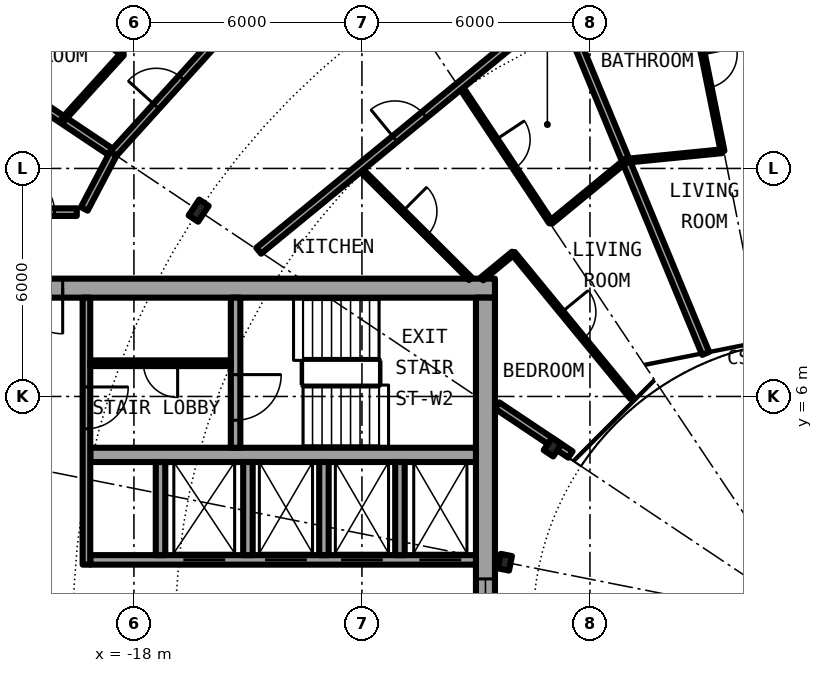
"""IFC4 building model, lengths in metres.
Left out: names, types, materials, properties, quantities, classifications, styles, units other than length and angle.
Written with IfcOpenShell. Run it as: python <this file> out.ifc"""

import sys

from ifc_helpers import new_model, si_unit, direction, frame, frame_2d, origin, origin_2d, place, context, subcontext, project, spatial, rectangle, i_section, extrude, element, fill, save


model = new_model("IFC4")
c1 = context("Model", 3, precision=1e-05, world=origin(), true_north=direction((0.0, 1.0)))
c2 = subcontext(c1, "Body", "Model", "MODEL_VIEW")
j1 = project(units=[si_unit("LENGTHUNIT", "METRE"), si_unit("PLANEANGLEUNIT", "RADIAN")], contexts=[c1])
p1 = place(None, origin())
s1 = spatial("IfcSite", under=j1, at=p1, CompositionType="ELEMENT")
p2 = place(p1, origin())
s2 = spatial("IfcBuilding", under=s1, at=p2, CompositionType="ELEMENT")
p3 = place(p2, frame((0.0, 0.0, 145.2)))
s3 = spatial("IfcBuildingStorey", under=s2, at=p3, CompositionType="ELEMENT", Elevation=145.2)
p4 = place(p3, frame((-16.297, 10.889, 0.0), z_axis=(0.0, 0.0, 1.0), x_axis=(-0.831469612303, 0.55557023302, 0.0)))
e1 = element("IfcColumn", 1, at=p4, inside=s3, PredefinedType="COLUMN", context=c2, shape_type="SweptSolid", body=[
    extrude(i_section(OverallWidth=0.3, OverallDepth=0.5, WebThickness=0.014, FlangeThickness=0.028, FilletRadius=0.027, at=origin_2d()), origin(), (0.0, 0.0, 1.0), 3.05),
])
for number, where, z_axis, x_axis in (
    (2, (-6.984, 4.667, 0.0), (0.0, 0.0, 1.0), (-0.831, 0.556, 0.0)),
    (3, (-8.239, 1.639, 0.0), (0.0, 0.0, 1.0), (-0.981, 0.195, 0.0)),
):
    element("IfcColumn", number, at=place(p3, frame(where, z_axis=z_axis, x_axis=x_axis)), inside=s3, PredefinedType="COLUMN", context=c2, shape_type="SweptSolid", body=[
        extrude(i_section(OverallWidth=0.3, OverallDepth=0.39, WebThickness=0.011, FlangeThickness=0.019, FilletRadius=0.027, at=origin_2d()), origin(), (0.0, 0.0, 1.0), 3.05),
    ])
p5 = place(p3, frame((-8.5, 8.85, 0.0), z_axis=(0.0, 0.0, 1.0), x_axis=(-1.0, 0.0, 0.0)))
e4 = element("IfcWall", 4, at=p5, inside=s3, PredefinedType="SHEAR", context=c2, shape_type="SweptSolid", body=[
    extrude(rectangle(XDim=13.6, YDim=0.5, at=frame_2d((6.8, 0.0))), origin(), (0.0, 0.0, 1.0), 3.05),
])
p6 = place(p5, frame((11.375, 0.0, 0.0)))
e5 = element("IfcOpeningElement", 5, at=p6, cuts=e4, PredefinedType="OPENING", context=c2, shape_type="SweptSolid", body=[
    extrude(rectangle(XDim=1.2, YDim=2.3, at=frame_2d((0.6, 1.15))), frame((0.0, 0.26, 0.0), z_axis=(0.0, -1.0, 0.0), x_axis=(1.0, 0.0, 0.0)), (0.0, 0.0, 1.0), 0.52),
])
p7 = place(p3, frame((-8.75, 8.6, 0.0), z_axis=(0.0, 0.0, 1.0), x_axis=(0.0, -1.0, 0.0)))
e6 = element("IfcWall", 6, at=p7, inside=s3, PredefinedType="SHEAR", context=c2, shape_type="SweptSolid", body=[
    extrude(rectangle(XDim=17.2, YDim=0.5, at=frame_2d((8.6, 0.0))), origin(), (0.0, 0.0, 1.0), 3.05),
])
p8 = place(p7, frame((7.4, 0.0, 0.1)))
e7 = element("IfcOpeningElement", 7, at=p8, cuts=e6, PredefinedType="OPENING", context=c2, shape_type="SweptSolid", body=[
    extrude(rectangle(XDim=2.4, YDim=2.2, at=frame_2d((1.2, 1.1))), frame((0.0, 0.26, 0.0), z_axis=(0.0, -1.0, 0.0), x_axis=(1.0, 0.0, 0.0)), (0.0, 0.0, 1.0), 0.52),
])
p9 = place(p3, frame((-9.0, 1.7, 0.0), z_axis=(0.0, 0.0, 1.0), x_axis=(-1.0, 0.0, 0.0)))
e8 = element("IfcWall", 8, at=p9, inside=s3, PredefinedType="SHEAR", context=c2, shape_type="SweptSolid", body=[
    extrude(rectangle(XDim=10.15, YDim=0.25, at=frame_2d((5.075, 0.0))), origin(), (0.0, 0.0, 1.0), 3.05),
])
p10 = place(p9, frame((0.387, 0.0, 0.0)))
e9 = element("IfcOpeningElement", 9, at=p10, cuts=e8, PredefinedType="OPENING", context=c2, shape_type="SweptSolid", body=[
    extrude(rectangle(XDim=1.1, YDim=2.3, at=frame_2d((0.55, 1.15))), frame((0.0, 0.135, 0.0), z_axis=(0.0, -1.0, 0.0), x_axis=(1.0, 0.0, 0.0)), (0.0, 0.0, 1.0), 0.27),
])
p11 = place(p9, frame((2.45, 0.0, 0.0)))
e10 = element("IfcOpeningElement", 10, at=p11, cuts=e8, PredefinedType="OPENING", context=c2, shape_type="SweptSolid", body=[
    extrude(rectangle(XDim=1.1, YDim=2.3, at=frame_2d((0.55, 1.15))), frame((0.0, 0.135, 0.0), z_axis=(0.0, -1.0, 0.0), x_axis=(1.0, 0.0, 0.0)), (0.0, 0.0, 1.0), 0.27),
])
p12 = place(p9, frame((4.45, 0.0, 0.0)))
e11 = element("IfcOpeningElement", 11, at=p12, cuts=e8, PredefinedType="OPENING", context=c2, shape_type="SweptSolid", body=[
    extrude(rectangle(XDim=1.1, YDim=2.3, at=frame_2d((0.55, 1.15))), frame((0.0, 0.135, 0.0), z_axis=(0.0, -1.0, 0.0), x_axis=(1.0, 0.0, 0.0)), (0.0, 0.0, 1.0), 0.27),
])
p13 = place(p9, frame((6.6, 0.0, 0.0)))
e12 = element("IfcOpeningElement", 12, at=p13, cuts=e8, PredefinedType="OPENING", context=c2, shape_type="SweptSolid", body=[
    extrude(rectangle(XDim=1.1, YDim=2.3, at=frame_2d((0.55, 1.15))), frame((0.0, 0.135, 0.0), z_axis=(0.0, -1.0, 0.0), x_axis=(1.0, 0.0, 0.0)), (0.0, 0.0, 1.0), 0.27),
])
p14 = place(p3, frame((-9.0, 4.462, 0.0), z_axis=(0.0, 0.0, 1.0), x_axis=(-1.0, 0.0, 0.0)))
e13 = element("IfcWall", 13, at=p14, inside=s3, PredefinedType="SHEAR", context=c2, shape_type="SweptSolid", body=[
    extrude(rectangle(XDim=10.15, YDim=0.375, at=frame_2d((5.075, 0.0))), origin(), (0.0, 0.0, 1.0), 3.05),
])
p15 = place(p3, frame((-15.325, 8.6, 0.0), z_axis=(0.0, 0.0, 1.0), x_axis=(0.0, -1.0, 0.0)))
e14 = element("IfcWall", 14, at=p15, inside=s3, PredefinedType="SHEAR", context=c2, shape_type="SweptSolid", body=[
    extrude(rectangle(XDim=3.95, YDim=0.25, at=frame_2d((1.975, 0.0))), origin(), (0.0, 0.0, 1.0), 3.05),
])
p16 = place(p15, frame((2.025, 0.0, 0.0)))
e15 = element("IfcOpeningElement", 15, at=p16, cuts=e14, PredefinedType="OPENING", context=c2, shape_type="SweptSolid", body=[
    extrude(rectangle(XDim=1.2, YDim=2.3, at=frame_2d((0.6, 1.15))), frame((0.0, 0.135, 0.0), z_axis=(0.0, -1.0, 0.0), x_axis=(1.0, 0.0, 0.0)), (0.0, 0.0, 1.0), 0.27),
])
for number, where, z_axis, x_axis in (
    (16, (-15.0, 1.825, 0.0), (0.0, 0.0, 1.0), (0.0, 1.0, 0.0)),
    (17, (-17.3, 1.825, 0.0), (0.0, 0.0, 1.0), (0.0, 1.0, 0.0)),
):
    element("IfcWall", number, at=place(p3, frame(where, z_axis=z_axis, x_axis=x_axis)), inside=s3, PredefinedType="SOLIDWALL", context=c2, shape_type="SweptSolid", body=[
        extrude(rectangle(XDim=2.45, YDim=0.25, at=frame_2d((1.225, 0.0))), origin(), (0.0, 0.0, 1.0), 2.7),
    ])
p17 = place(p3, frame((-19.25, 8.6, 0.0), z_axis=(0.0, 0.0, 1.0), x_axis=(0.0, -1.0, 0.0)))
e18 = element("IfcWall", 18, at=p17, inside=s3, PredefinedType="SOLIDWALL", context=c2, shape_type="SweptSolid", body=[
    extrude(rectangle(XDim=7.025, YDim=0.2, at=frame_2d((3.513, 0.0))), origin(), (0.0, 0.0, 1.0), 2.7),
])
p18 = place(p17, frame((2.35, 0.0, 0.0)))
e19 = element("IfcOpeningElement", 19, at=p18, cuts=e18, PredefinedType="OPENING", context=c2, shape_type="SweptSolid", body=[
    extrude(rectangle(XDim=1.1, YDim=2.3, at=frame_2d((0.55, 1.15))), frame((0.0, 0.11, 0.0), z_axis=(0.0, -1.0, 0.0), x_axis=(1.0, 0.0, 0.0)), (0.0, 0.0, 1.0), 0.22),
])
for number, where, z_axis, x_axis in (
    (20, (-11.0, 1.825, 0.0), (0.0, 0.0, 1.0), (0.0, 1.0, 0.0)),
    (21, (-13.0, 1.825, 0.0), (0.0, 0.0, 1.0), (0.0, 1.0, 0.0)),
):
    element("IfcWall", number, at=place(p3, frame(where, z_axis=z_axis, x_axis=x_axis)), inside=s3, PredefinedType="SOLIDWALL", context=c2, shape_type="SweptSolid", body=[
        extrude(rectangle(XDim=2.45, YDim=0.25, at=frame_2d((1.225, 0.0))), origin(), (0.0, 0.0, 1.0), 2.7),
    ])
p19 = place(p3, frame((-15.45, 6.875, 0.0), z_axis=(0.0, 0.0, 1.0), x_axis=(-1.0, 0.0, 0.0)))
e22 = element("IfcWall", 22, at=p19, inside=s3, PredefinedType="PARTITIONING", context=c2, shape_type="SweptSolid", body=[
    extrude(rectangle(XDim=3.7, YDim=0.15, at=frame_2d((1.85, 0.0))), origin(), (0.0, 0.0, 1.0), 2.7),
])
p20 = place(p19, frame((1.4, 0.0, 0.0)))
e23 = element("IfcOpeningElement", 23, at=p20, cuts=e22, PredefinedType="OPENING", context=c2, shape_type="SweptSolid", body=[
    extrude(rectangle(XDim=0.9, YDim=2.3, at=frame_2d((0.45, 1.15))), frame((0.0, 0.085, 0.0), z_axis=(0.0, -1.0, 0.0), x_axis=(1.0, 0.0, 0.0)), (0.0, 0.0, 1.0), 0.17),
])
p21 = place(p3, frame((-22.595, 15.098, 0.0), z_axis=(0.0, 0.0, 1.0), x_axis=(0.831387096605, -0.55569370664, 0.0)))
e24 = element("IfcWall", 24, at=p21, inside=s3, PredefinedType="PARTITIONING", context=c2, shape_type="SweptSolid", body=[
    extrude(rectangle(XDim=4.875, YDim=0.2, at=frame_2d((2.438, 0.0))), origin(), (0.0, 0.0, 1.0), 2.7),
])
p22 = place(p3, frame((-21.012, 17.233, 0.0), z_axis=(0.0, 0.0, 1.0), x_axis=(0.773165322764, -0.634204528267, 0.0)))
e25 = element("IfcWall", 25, at=p22, inside=s3, PredefinedType="PARTITIONING", context=c2, shape_type="SweptSolid", body=[
    extrude(rectangle(XDim=3.505, YDim=0.1, at=frame_2d((1.752, 0.0))), origin(), (0.0, 0.0, 1.0), 2.7),
])
p23 = place(p22, frame((1.303, 0.0, 0.0)))
e26 = element("IfcOpeningElement", 26, at=p23, cuts=e25, PredefinedType="OPENING", context=c2, shape_type="SweptSolid", body=[
    extrude(rectangle(XDim=0.9, YDim=2.3, at=frame_2d((0.45, 1.15))), frame((0.0, 0.06, 0.0), z_axis=(0.0, -1.0, 0.0), x_axis=(1.0, 0.0, 0.0)), (0.0, 0.0, 1.0), 0.12),
])
p24 = place(p3, frame((-12.069, 12.007, 0.0), z_axis=(0.0, 0.0, 1.0), x_axis=(0.708822693149, -0.705386695138, 0.0)))
e27 = element("IfcWall", 27, at=p24, inside=s3, PredefinedType="PARTITIONING", context=c2, shape_type="SweptSolid", body=[
    extrude(rectangle(XDim=4.121, YDim=0.1, at=frame_2d((2.061, 0.0))), origin(), (0.0, 0.0, 1.0), 2.7),
])
p25 = place(p24, frame((1.611, 0.0, 0.0)))
e28 = element("IfcOpeningElement", 28, at=p25, cuts=e27, PredefinedType="OPENING", context=c2, shape_type="SweptSolid", body=[
    extrude(rectangle(XDim=0.9, YDim=2.3, at=frame_2d((0.45, 1.15))), frame((0.0, 0.06, 0.0), z_axis=(0.0, -1.0, 0.0), x_axis=(1.0, 0.0, 0.0)), (0.0, 0.0, 1.0), 0.12),
])
p26 = place(p3, frame((-9.421, 14.18, 0.0), z_axis=(0.0, 0.0, 1.0), x_axis=(0.553303732327, -0.832979579457, 0.0)))
e29 = element("IfcWall", 29, at=p26, inside=s3, PredefinedType="PARTITIONING", context=c2, shape_type="SweptSolid", body=[
    extrude(rectangle(XDim=4.319, YDim=0.1, at=frame_2d((2.16, 0.0))), origin(), (0.0, 0.0, 1.0), 2.7),
])
p27 = place(p26, frame((1.71, 0.0, 0.0)))
e30 = element("IfcOpeningElement", 30, at=p27, cuts=e29, PredefinedType="OPENING", context=c2, shape_type="SweptSolid", body=[
    extrude(rectangle(XDim=0.9, YDim=2.3, at=frame_2d((0.45, 1.15))), frame((0.0, 0.06, 0.0), z_axis=(0.0, -1.0, 0.0), x_axis=(1.0, 0.0, 0.0)), (0.0, 0.0, 1.0), 0.12),
])
p28 = place(p3, frame((-8.019, 9.771, 0.0), z_axis=(0.0, 0.0, 1.0), x_axis=(0.634401778971, -0.773003481776, 0.0)))
e31 = element("IfcWall", 31, at=p28, inside=s3, PredefinedType="PARTITIONING", context=c2, shape_type="SweptSolid", body=[
    extrude(rectangle(XDim=4.92, YDim=0.1, at=frame_2d((2.46, 0.0))), origin(), (0.0, 0.0, 1.0), 2.7),
])
p29 = place(p28, frame((2.01, 0.0, 0.0)))
e32 = element("IfcOpeningElement", 32, at=p29, cuts=e31, PredefinedType="OPENING", context=c2, shape_type="SweptSolid", body=[
    extrude(rectangle(XDim=0.9, YDim=2.3, at=frame_2d((0.45, 1.15))), frame((0.0, 0.06, 0.0), z_axis=(0.0, -1.0, 0.0), x_axis=(1.0, 0.0, 0.0)), (0.0, 0.0, 1.0), 0.12),
])
p30 = place(p3, frame((-6.775, 16.352, 0.0), z_axis=(0.0, 0.0, 1.0), x_axis=(0.382750767534, -0.923851638496, 0.0)))
e33 = element("IfcWall", 33, at=p30, inside=s3, PredefinedType="PARTITIONING", context=c2, shape_type="SweptSolid", body=[
    extrude(rectangle(XDim=9.98, YDim=0.2, at=frame_2d((4.99, 0.0))), origin(), (0.0, 0.0, 1.0), 2.7),
])
p31 = place(p3, frame((-3.365, 16.688, 0.0), z_axis=(0.0, 0.0, 1.0), x_axis=(0.197724661373, -0.980257597923, 0.0)))
e34 = element("IfcWall", 34, at=p31, inside=s3, PredefinedType="PARTITIONING", context=c2, shape_type="SweptSolid", body=[
    extrude(rectangle(XDim=4.319, YDim=0.1, at=frame_2d((2.16, 0.0))), origin(), (0.0, 0.0, 1.0), 2.7),
])
p32 = place(p31, frame((1.71, 0.0, 0.0)))
e35 = element("IfcOpeningElement", 35, at=p32, cuts=e34, PredefinedType="OPENING", context=c2, shape_type="SweptSolid", body=[
    extrude(rectangle(XDim=0.9, YDim=2.3, at=frame_2d((0.45, 1.15))), frame((0.0, 0.06, 0.0), z_axis=(0.0, -1.0, 0.0), x_axis=(1.0, 0.0, 0.0)), (0.0, 0.0, 1.0), 0.12),
])
p33 = place(p3, frame((-6.513, 4.472, 0.0), z_axis=(0.0, 0.0, 1.0), x_axis=(-0.83133816625, 0.555766905579, 0.0)))
e36 = element("IfcWall", 36, at=p33, inside=s3, PredefinedType="PARTITIONING", context=c2, shape_type="SweptSolid", body=[
    extrude(rectangle(XDim=2.323, YDim=0.2, at=frame_2d((1.162, 0.0))), origin(), (0.0, 0.0, 1.0), 2.7),
])
p34 = place(p3, frame((-21.675, 10.85, 0.0), z_axis=(0.0, 0.0, 1.0), x_axis=(1.0, 0.0, 0.0)))
e37 = element("IfcWall", 37, at=p34, inside=s3, PredefinedType="PARTITIONING", context=c2, shape_type="SweptSolid", body=[
    extrude(rectangle(XDim=2.171, YDim=0.2, at=frame_2d((1.085, 0.0))), origin(), (0.0, 0.0, 1.0), 2.7),
])
p35 = place(p34, frame((0.585, 0.0, 0.0)))
e38 = element("IfcOpeningElement", 38, at=p35, cuts=e37, PredefinedType="OPENING", context=c2, shape_type="SweptSolid", body=[
    extrude(rectangle(XDim=1.0, YDim=2.3, at=frame_2d((0.5, 1.15))), frame((0.0, 0.11, 0.0), z_axis=(0.0, -1.0, 0.0), x_axis=(1.0, 0.0, 0.0)), (0.0, 0.0, 1.0), 0.22),
])
p36 = place(p3, frame((-8.842, 9.095, 0.0), z_axis=(0.0, 0.0, 1.0), x_axis=(0.772730269942, 0.634734534995, 0.0)))
e39 = element("IfcWall", 39, at=p36, inside=s3, PredefinedType="PARTITIONING", context=c2, shape_type="SweptSolid", body=[
    extrude(rectangle(XDim=1.065, YDim=0.1, at=frame_2d((0.532, 0.0))), origin(), (0.0, 0.0, 1.0), 2.7),
])
p37 = place(p3, frame((-7.034, 10.58, 0.0), z_axis=(0.0, 0.0, 1.0), x_axis=(0.772764723682, 0.634692588449, 0.0)))
e40 = element("IfcWall", 40, at=p37, inside=s3, PredefinedType="PARTITIONING", context=c2, shape_type="SweptSolid", body=[
    extrude(rectangle(XDim=2.557, YDim=0.1, at=frame_2d((1.278, 0.0))), origin(), (0.0, 0.0, 1.0), 2.7),
])
p38 = place(p3, frame((-5.065, 12.2, 0.0), z_axis=(0.0, 0.0, 1.0), x_axis=(0.995131297413, 0.098558109302, 0.0)))
e41 = element("IfcWall", 41, at=p38, inside=s3, PredefinedType="PARTITIONING", context=c2, shape_type="SweptSolid", body=[
    extrude(rectangle(XDim=2.556, YDim=0.1, at=frame_2d((1.278, 0.0))), origin(), (0.0, 0.0, 1.0), 2.7),
])
p39 = place(p3, frame((-14.717, 9.834, 0.0), z_axis=(0.0, 0.0, 1.0), x_axis=(0.773034536097, 0.634363938131, 0.0)))
e42 = element("IfcWall", 42, at=p39, inside=s3, PredefinedType="PARTITIONING", context=c2, shape_type="SweptSolid", body=[
    extrude(rectangle(XDim=10.277, YDim=0.2, at=frame_2d((5.138, 0.0))), origin(), (0.0, 0.0, 1.0), 2.7),
])
p40 = place(p39, frame((4.638, 0.0, 0.0)))
e43 = element("IfcOpeningElement", 43, at=p40, cuts=e42, PredefinedType="OPENING", context=c2, shape_type="SweptSolid", body=[
    extrude(rectangle(XDim=1.0, YDim=2.3, at=frame_2d((0.5, 1.15))), frame((0.0, 0.11, 0.0), z_axis=(0.0, -1.0, 0.0), x_axis=(1.0, 0.0, 0.0)), (0.0, 0.0, 1.0), 0.22),
])
p41 = place(p3, frame((-18.542, 12.389, 0.0), z_axis=(0.0, 0.0, 1.0), x_axis=(0.671561669125, 0.740948665268, 0.0)))
e44 = element("IfcWall", 44, at=p41, inside=s3, PredefinedType="PARTITIONING", context=c2, shape_type="SweptSolid", body=[
    extrude(rectangle(XDim=6.544, YDim=0.2, at=frame_2d((3.272, 0.0))), origin(), (0.0, 0.0, 1.0), 2.7),
])
p42 = place(p41, frame((1.682, 0.0, 0.0)))
e45 = element("IfcOpeningElement", 45, at=p42, cuts=e44, PredefinedType="OPENING", context=c2, shape_type="SweptSolid", body=[
    extrude(rectangle(XDim=1.0, YDim=2.3, at=frame_2d((0.5, 1.15))), frame((0.0, 0.11, 0.0), z_axis=(0.0, -1.0, 0.0), x_axis=(1.0, 0.0, 0.0)), (0.0, 0.0, 1.0), 0.22),
])
p43 = place(p3, frame((-19.307, 10.935, 0.0), z_axis=(0.0, 0.0, 1.0), x_axis=(0.465605550524, 0.884992356646, 0.0)))
e46 = element("IfcWall", 46, at=p43, inside=s3, PredefinedType="PARTITIONING", context=c2, shape_type="SweptSolid", body=[
    extrude(rectangle(XDim=1.643, YDim=0.2, at=frame_2d((0.821, 0.0))), origin(), (0.0, 0.0, 1.0), 2.7),
])
p44 = place(p3, frame((-19.872, 13.278, 0.0), z_axis=(0.0, 0.0, 1.0), x_axis=(0.671637685376, 0.740879760544, 0.0)))
e47 = element("IfcWall", 47, at=p44, inside=s3, PredefinedType="PARTITIONING", context=c2, shape_type="SweptSolid", body=[
    extrude(rectangle(XDim=2.338, YDim=0.1, at=frame_2d((1.169, 0.0))), origin(), (0.0, 0.0, 1.0), 2.7),
])
p45 = place(p10, origin())
e48 = element("IfcDoor", 48, at=p45, inside=s3, OperationType="DOUBLE_DOOR_SLIDING", PredefinedType="DOOR", context=c2, shape_type="SweptSolid", body=[
    extrude(rectangle(XDim=1.1, YDim=2.3, at=frame_2d((0.55, 1.15))), frame((0.0, 0.025, 0.0), z_axis=(0.0, -1.0, 0.0), x_axis=(1.0, 0.0, 0.0)), (0.0, 0.0, 1.0), 0.05),
])
fill(e9, e48)
p46 = place(p11, origin())
e49 = element("IfcDoor", 49, at=p46, inside=s3, OperationType="DOUBLE_DOOR_SLIDING", PredefinedType="DOOR", context=c2, shape_type="SweptSolid", body=[
    extrude(rectangle(XDim=1.1, YDim=2.3, at=frame_2d((0.55, 1.15))), frame((0.0, 0.025, 0.0), z_axis=(0.0, -1.0, 0.0), x_axis=(1.0, 0.0, 0.0)), (0.0, 0.0, 1.0), 0.05),
])
fill(e10, e49)
p47 = place(p12, origin())
e50 = element("IfcDoor", 50, at=p47, inside=s3, OperationType="DOUBLE_DOOR_SLIDING", PredefinedType="DOOR", context=c2, shape_type="SweptSolid", body=[
    extrude(rectangle(XDim=1.1, YDim=2.3, at=frame_2d((0.55, 1.15))), frame((0.0, 0.025, 0.0), z_axis=(0.0, -1.0, 0.0), x_axis=(1.0, 0.0, 0.0)), (0.0, 0.0, 1.0), 0.05),
])
fill(e11, e50)
p48 = place(p13, origin())
e51 = element("IfcDoor", 51, at=p48, inside=s3, OperationType="DOUBLE_DOOR_SLIDING", PredefinedType="DOOR", context=c2, shape_type="SweptSolid", body=[
    extrude(rectangle(XDim=1.1, YDim=2.3, at=frame_2d((0.55, 1.15))), frame((0.0, 0.025, 0.0), z_axis=(0.0, -1.0, 0.0), x_axis=(1.0, 0.0, 0.0)), (0.0, 0.0, 1.0), 0.05),
])
fill(e12, e51)
p49 = place(p20, origin())
e52 = element("IfcDoor", 52, at=p49, inside=s3, OperationType="SINGLE_SWING_LEFT", PredefinedType="DOOR", context=c2, shape_type="SweptSolid", body=[
    extrude(rectangle(XDim=0.9, YDim=2.3, at=frame_2d((0.45, 1.15))), frame((0.0, 0.025, 0.0), z_axis=(0.0, -1.0, 0.0), x_axis=(1.0, 0.0, 0.0)), (0.0, 0.0, 1.0), 0.05),
])
fill(e23, e52)
p50 = place(p16, origin())
e53 = element("IfcDoor", 53, at=p50, inside=s3, OperationType="SINGLE_SWING_LEFT", PredefinedType="DOOR", context=c2, shape_type="SweptSolid", body=[
    extrude(rectangle(XDim=1.2, YDim=2.3, at=frame_2d((0.6, 1.15))), frame((0.0, 0.025, 0.0), z_axis=(0.0, -1.0, 0.0), x_axis=(1.0, 0.0, 0.0)), (0.0, 0.0, 1.0), 0.05),
])
fill(e15, e53)
p51 = place(p18, origin())
e54 = element("IfcDoor", 54, at=p51, inside=s3, OperationType="SINGLE_SWING_RIGHT", PredefinedType="DOOR", context=c2, shape_type="SweptSolid", body=[
    extrude(rectangle(XDim=1.1, YDim=2.3, at=frame_2d((0.55, 1.15))), frame((0.0, 0.025, 0.0), z_axis=(0.0, -1.0, 0.0), x_axis=(1.0, 0.0, 0.0)), (0.0, 0.0, 1.0), 0.05),
])
fill(e19, e54)
p52 = place(p6, origin())
e55 = element("IfcDoor", 55, at=p52, inside=s3, OperationType="SINGLE_SWING_LEFT", PredefinedType="DOOR", context=c2, shape_type="SweptSolid", body=[
    extrude(rectangle(XDim=1.2, YDim=2.3, at=frame_2d((0.6, 1.15))), frame((0.0, 0.025, 0.0), z_axis=(0.0, -1.0, 0.0), x_axis=(1.0, 0.0, 0.0)), (0.0, 0.0, 1.0), 0.05),
])
fill(e5, e55)
p53 = place(p8, origin())
e56 = element("IfcWindow", 56, at=p53, inside=s3, PartitioningType="SINGLE_PANEL", PredefinedType="WINDOW", context=c2, shape_type="SweptSolid", body=[
    extrude(rectangle(XDim=2.4, YDim=2.2, at=frame_2d((1.2, 1.1))), frame((0.0, 0.03, 0.0), z_axis=(0.0, -1.0, 0.0), x_axis=(1.0, 0.0, 0.0)), (0.0, 0.0, 1.0), 0.06),
])
fill(e7, e56)
p54 = place(p42, origin())
e57 = element("IfcDoor", 57, at=p54, inside=s3, OperationType="SINGLE_SWING_LEFT", PredefinedType="DOOR", context=c2, shape_type="SweptSolid", body=[
    extrude(rectangle(XDim=1.0, YDim=2.3, at=frame_2d((0.5, 1.15))), frame((0.0, 0.025, 0.0), z_axis=(0.0, -1.0, 0.0), x_axis=(1.0, 0.0, 0.0)), (0.0, 0.0, 1.0), 0.05),
])
fill(e45, e57)
p55 = place(p32, origin())
e58 = element("IfcDoor", 58, at=p55, inside=s3, OperationType="SINGLE_SWING_RIGHT", PredefinedType="DOOR", context=c2, shape_type="SweptSolid", body=[
    extrude(rectangle(XDim=0.9, YDim=2.3, at=frame_2d((0.45, 1.15))), frame((0.0, 0.025, 0.0), z_axis=(0.0, -1.0, 0.0), x_axis=(1.0, 0.0, 0.0)), (0.0, 0.0, 1.0), 0.05),
])
fill(e35, e58)
p56 = place(p40, origin())
e59 = element("IfcDoor", 59, at=p56, inside=s3, OperationType="SINGLE_SWING_LEFT", PredefinedType="DOOR", context=c2, shape_type="SweptSolid", body=[
    extrude(rectangle(XDim=1.0, YDim=2.3, at=frame_2d((0.5, 1.15))), frame((0.0, 0.025, 0.0), z_axis=(0.0, -1.0, 0.0), x_axis=(1.0, 0.0, 0.0)), (0.0, 0.0, 1.0), 0.05),
])
fill(e43, e59)
p57 = place(p27, origin())
e60 = element("IfcDoor", 60, at=p57, inside=s3, OperationType="SINGLE_SWING_RIGHT", PredefinedType="DOOR", context=c2, shape_type="SweptSolid", body=[
    extrude(rectangle(XDim=0.9, YDim=2.3, at=frame_2d((0.45, 1.15))), frame((0.0, 0.025, 0.0), z_axis=(0.0, -1.0, 0.0), x_axis=(1.0, 0.0, 0.0)), (0.0, 0.0, 1.0), 0.05),
])
fill(e30, e60)
p58 = place(p25, origin())
e61 = element("IfcDoor", 61, at=p58, inside=s3, OperationType="SINGLE_SWING_RIGHT", PredefinedType="DOOR", context=c2, shape_type="SweptSolid", body=[
    extrude(rectangle(XDim=0.9, YDim=2.3, at=frame_2d((0.45, 1.15))), frame((0.0, 0.025, 0.0), z_axis=(0.0, -1.0, 0.0), x_axis=(1.0, 0.0, 0.0)), (0.0, 0.0, 1.0), 0.05),
])
fill(e28, e61)
p59 = place(p29, origin())
e62 = element("IfcDoor", 62, at=p59, inside=s3, OperationType="SINGLE_SWING_RIGHT", PredefinedType="DOOR", context=c2, shape_type="SweptSolid", body=[
    extrude(rectangle(XDim=0.9, YDim=2.3, at=frame_2d((0.45, 1.15))), frame((0.0, 0.025, 0.0), z_axis=(0.0, -1.0, 0.0), x_axis=(1.0, 0.0, 0.0)), (0.0, 0.0, 1.0), 0.05),
])
fill(e32, e62)
p60 = place(p35, origin())
e63 = element("IfcDoor", 63, at=p60, inside=s3, OperationType="SINGLE_SWING_LEFT", PredefinedType="DOOR", context=c2, shape_type="SweptSolid", body=[
    extrude(rectangle(XDim=1.0, YDim=2.3, at=frame_2d((0.5, 1.15))), frame((0.0, 0.025, 0.0), z_axis=(0.0, -1.0, 0.0), x_axis=(1.0, 0.0, 0.0)), (0.0, 0.0, 1.0), 0.05),
])
fill(e38, e63)
save(model, sys.argv[1])
